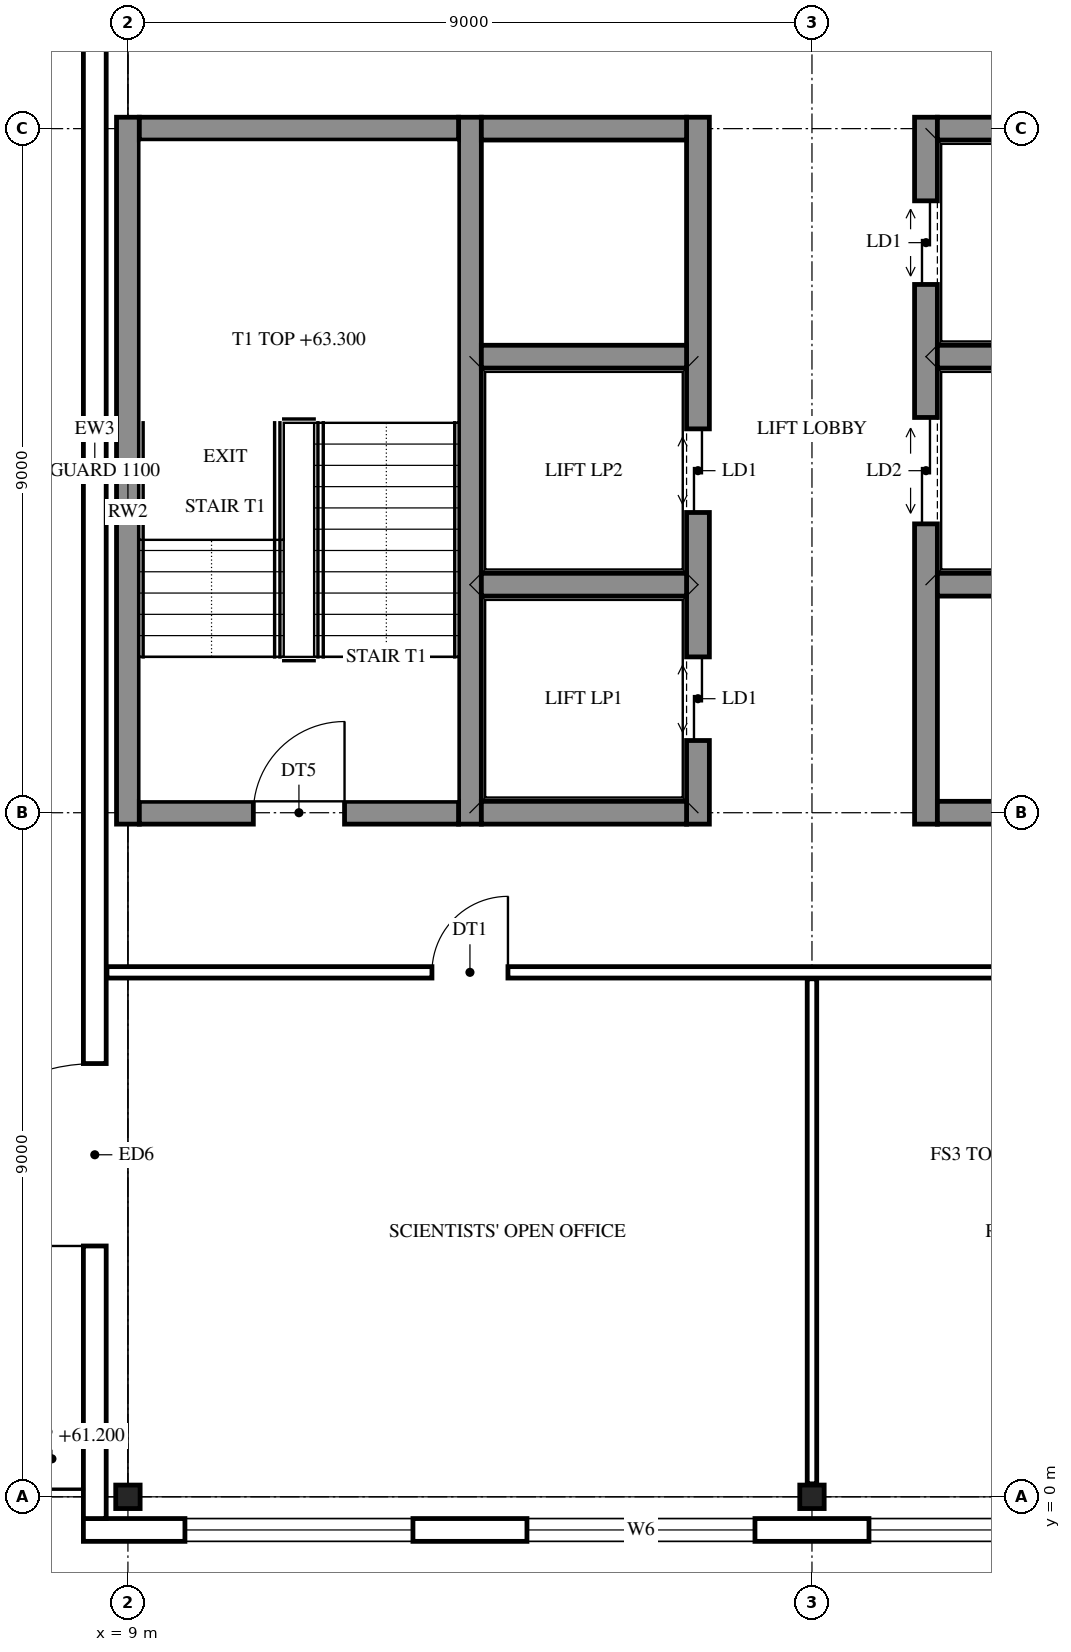
"""IFC4 building model, lengths in metres.
Left out: names, types, materials, properties, quantities, classifications, styles, units other than length and angle.
Written with IfcOpenShell. Run it as: python <this file> out.ifc"""

import sys

from ifc_helpers import new_model, si_unit, direction, frame, frame_2d, origin, origin_2d, place, context, subcontext, project, spatial, rectangle, i_section, extrude, element, fill, save


model = new_model("IFC4")
c1 = context("Model", 3, precision=1e-05, world=origin(), true_north=direction((0.0, 1.0)))
c2 = subcontext(c1, "Body", "Model", "MODEL_VIEW")
j1 = project(units=[si_unit("LENGTHUNIT", "METRE"), si_unit("PLANEANGLEUNIT", "RADIAN")], contexts=[c1])
p1 = place(None, origin())
s1 = spatial("IfcSite", under=j1, at=p1, CompositionType="ELEMENT")
p2 = place(p1, origin())
s2 = spatial("IfcBuilding", under=s1, at=p2, CompositionType="ELEMENT")
p3 = place(p2, frame((0.0, 0.0, 61.2)))
s3 = spatial("IfcBuildingStorey", under=s2, at=p3, CompositionType="ELEMENT", Elevation=61.2)
for number, where, z_axis, x_axis in (
    (1, (9.0, 0.0, 0.0), (0.0, 0.0, 1.0), (0.0, 1.0, 0.0)),
    (2, (18.0, 0.0, 0.0), (0.0, 0.0, 1.0), (0.0, 1.0, 0.0)),
):
    element("IfcColumn", number, at=place(p3, frame(where, z_axis=z_axis, x_axis=x_axis)), inside=s3, PredefinedType="COLUMN", context=c2, shape_type="SweptSolid", body=[
        extrude(i_section(OverallWidth=0.309, OverallDepth=0.321, WebThickness=0.014, FlangeThickness=0.022, FilletRadius=0.017, at=origin_2d()), origin(), (0.0, 0.0, 1.0), 4.2),
    ])
for number, where, z_axis, x_axis in (
    (3, (9.0, 8.85, 0.0), (0.0, 0.0, 1.0), (0.0, 1.0, 0.0)),
    (4, (13.5, 8.85, 0.0), (0.0, 0.0, 1.0), (0.0, 1.0, 0.0)),
):
    element("IfcWall", number, at=place(p3, frame(where, z_axis=z_axis, x_axis=x_axis)), inside=s3, PredefinedType="SHEAR", context=c2, shape_type="SweptSolid", body=[
        extrude(rectangle(XDim=9.3, YDim=0.3, at=frame_2d((4.65, 0.0))), origin(), (0.0, 0.0, 1.0), 4.2),
    ])
p4 = place(p3, frame((16.5, 8.85, 0.0), z_axis=(0.0, 0.0, 1.0), x_axis=(0.0, 1.0, 0.0)))
e5 = element("IfcWall", 5, at=p4, inside=s3, PredefinedType="SHEAR", context=c2, shape_type="SweptSolid", body=[
    extrude(rectangle(XDim=9.3, YDim=0.3, at=frame_2d((4.65, 0.0))), origin(), (0.0, 0.0, 1.0), 4.2),
])
p5 = place(p4, frame((1.1, 0.0, 0.0)))
e6 = element("IfcOpeningElement", 6, at=p5, cuts=e5, PredefinedType="OPENING", context=c2, shape_type="SweptSolid", body=[
    extrude(rectangle(XDim=1.1, YDim=2.1, at=frame_2d((0.55, 1.05))), frame((0.0, 0.16, 0.0), z_axis=(0.0, -1.0, 0.0), x_axis=(1.0, 0.0, 0.0)), (0.0, 0.0, 1.0), 0.32),
])
p6 = place(p4, frame((4.1, 0.0, 0.0)))
e7 = element("IfcOpeningElement", 7, at=p6, cuts=e5, PredefinedType="OPENING", context=c2, shape_type="SweptSolid", body=[
    extrude(rectangle(XDim=1.1, YDim=2.1, at=frame_2d((0.55, 1.05))), frame((0.0, 0.16, 0.0), z_axis=(0.0, -1.0, 0.0), x_axis=(1.0, 0.0, 0.0)), (0.0, 0.0, 1.0), 0.32),
])
p7 = place(p3, frame((19.5, 8.85, 0.0), z_axis=(0.0, 0.0, 1.0), x_axis=(0.0, 1.0, 0.0)))
e8 = element("IfcWall", 8, at=p7, inside=s3, PredefinedType="SHEAR", context=c2, shape_type="SweptSolid", body=[
    extrude(rectangle(XDim=9.3, YDim=0.3, at=frame_2d((4.65, 0.0))), origin(), (0.0, 0.0, 1.0), 4.2),
])
p8 = place(p7, frame((3.95, 0.0, 0.0)))
e9 = element("IfcOpeningElement", 9, at=p8, cuts=e8, PredefinedType="OPENING", context=c2, shape_type="SweptSolid", body=[
    extrude(rectangle(XDim=1.4, YDim=2.1, at=frame_2d((0.7, 1.05))), frame((0.0, 0.16, 0.0), z_axis=(0.0, -1.0, 0.0), x_axis=(1.0, 0.0, 0.0)), (0.0, 0.0, 1.0), 0.32),
])
p9 = place(p7, frame((7.1, 0.0, 0.0)))
e10 = element("IfcOpeningElement", 10, at=p9, cuts=e8, PredefinedType="OPENING", context=c2, shape_type="SweptSolid", body=[
    extrude(rectangle(XDim=1.1, YDim=2.1, at=frame_2d((0.55, 1.05))), frame((0.0, 0.16, 0.0), z_axis=(0.0, -1.0, 0.0), x_axis=(1.0, 0.0, 0.0)), (0.0, 0.0, 1.0), 0.32),
])
p10 = place(p3, frame((9.15, 9.0, 0.0), z_axis=(0.0, 0.0, 1.0), x_axis=(1.0, 0.0, 0.0)))
e11 = element("IfcWall", 11, at=p10, inside=s3, PredefinedType="SHEAR", context=c2, shape_type="SweptSolid", body=[
    extrude(rectangle(XDim=4.2, YDim=0.3, at=frame_2d((2.1, 0.0))), origin(), (0.0, 0.0, 1.0), 4.2),
])
p11 = place(p10, frame((1.5, 0.0, 0.0)))
e12 = element("IfcOpeningElement", 12, at=p11, cuts=e11, PredefinedType="OPENING", context=c2, shape_type="SweptSolid", body=[
    extrude(rectangle(XDim=1.2, YDim=2.1, at=frame_2d((0.6, 1.05))), frame((0.0, 0.16, 0.0), z_axis=(0.0, -1.0, 0.0), x_axis=(1.0, 0.0, 0.0)), (0.0, 0.0, 1.0), 0.32),
])
for number, where, z_axis, x_axis in (
    (13, (13.65, 9.0, 0.0), (0.0, 0.0, 1.0), (1.0, 0.0, 0.0)),
    (14, (19.65, 9.0, 0.0), (0.0, 0.0, 1.0), (1.0, 0.0, 0.0)),
    (15, (13.65, 12.0, 0.0), (0.0, 0.0, 1.0), (1.0, 0.0, 0.0)),
    (16, (19.65, 12.0, 0.0), (0.0, 0.0, 1.0), (1.0, 0.0, 0.0)),
    (17, (13.65, 15.0, 0.0), (0.0, 0.0, 1.0), (1.0, 0.0, 0.0)),
    (18, (19.65, 15.0, 0.0), (0.0, 0.0, 1.0), (1.0, 0.0, 0.0)),
):
    element("IfcWall", number, at=place(p3, frame(where, z_axis=z_axis, x_axis=x_axis)), inside=s3, PredefinedType="SHEAR", context=c2, shape_type="SweptSolid", body=[
        extrude(rectangle(XDim=2.7, YDim=0.3, at=frame_2d((1.35, 0.0))), origin(), (0.0, 0.0, 1.0), 4.2),
    ])
p12 = place(p3, frame((9.15, 18.0, 0.0), z_axis=(0.0, 0.0, 1.0), x_axis=(1.0, 0.0, 0.0)))
e19 = element("IfcWall", 19, at=p12, inside=s3, PredefinedType="SHEAR", context=c2, shape_type="SweptSolid", body=[
    extrude(rectangle(XDim=4.2, YDim=0.3, at=frame_2d((2.1, 0.0))), origin(), (0.0, 0.0, 1.0), 4.2),
])
for number, where, z_axis, x_axis in (
    (20, (13.65, 18.0, 0.0), (0.0, 0.0, 1.0), (1.0, 0.0, 0.0)),
    (21, (19.65, 18.0, 0.0), (0.0, 0.0, 1.0), (1.0, 0.0, 0.0)),
):
    element("IfcWall", number, at=place(p3, frame(where, z_axis=z_axis, x_axis=x_axis)), inside=s3, PredefinedType="SHEAR", context=c2, shape_type="SweptSolid", body=[
        extrude(rectangle(XDim=2.7, YDim=0.3, at=frame_2d((1.35, 0.0))), origin(), (0.0, 0.0, 1.0), 4.2),
    ])
p13 = place(p3, frame((32.075, -0.436, 0.0), z_axis=(0.0, 0.0, 1.0), x_axis=(-1.0, 0.0, 0.0)))
e22 = element("IfcWall", 22, at=p13, inside=s3, PredefinedType="STANDARD", context=c2, shape_type="SweptSolid", body=[
    extrude(rectangle(XDim=23.661, YDim=0.3, at=frame_2d((11.831, 0.0))), origin(), (0.0, 0.0, 1.0), 4.2),
])
p14 = place(p13, frame((19.325, 0.0, 0.6)))
e23 = element("IfcOpeningElement", 23, at=p14, cuts=e22, PredefinedType="OPENING", context=c2, shape_type="SweptSolid", body=[
    extrude(rectangle(XDim=3.0, YDim=2.8, at=frame_2d((1.5, 1.4))), frame((0.0, 0.16, 0.0), z_axis=(0.0, -1.0, 0.0), x_axis=(1.0, 0.0, 0.0)), (0.0, 0.0, 1.0), 0.32),
])
p15 = place(p13, frame((14.825, 0.0, 0.6)))
e24 = element("IfcOpeningElement", 24, at=p15, cuts=e22, PredefinedType="OPENING", context=c2, shape_type="SweptSolid", body=[
    extrude(rectangle(XDim=3.0, YDim=2.8, at=frame_2d((1.5, 1.4))), frame((0.0, 0.16, 0.0), z_axis=(0.0, -1.0, 0.0), x_axis=(1.0, 0.0, 0.0)), (0.0, 0.0, 1.0), 0.32),
])
p16 = place(p13, frame((10.325, 0.0, 0.6)))
e25 = element("IfcOpeningElement", 25, at=p16, cuts=e22, PredefinedType="OPENING", context=c2, shape_type="SweptSolid", body=[
    extrude(rectangle(XDim=3.0, YDim=2.8, at=frame_2d((1.5, 1.4))), frame((0.0, 0.16, 0.0), z_axis=(0.0, -1.0, 0.0), x_axis=(1.0, 0.0, 0.0)), (0.0, 0.0, 1.0), 0.32),
])
p17 = place(p13, frame((5.825, 0.0, 0.6)))
e26 = element("IfcOpeningElement", 26, at=p17, cuts=e22, PredefinedType="OPENING", context=c2, shape_type="SweptSolid", body=[
    extrude(rectangle(XDim=3.0, YDim=2.8, at=frame_2d((1.5, 1.4))), frame((0.0, 0.16, 0.0), z_axis=(0.0, -1.0, 0.0), x_axis=(1.0, 0.0, 0.0)), (0.0, 0.0, 1.0), 0.32),
])
p18 = place(p13, frame((1.325, 0.0, 0.6)))
e27 = element("IfcOpeningElement", 27, at=p18, cuts=e22, PredefinedType="OPENING", context=c2, shape_type="SweptSolid", body=[
    extrude(rectangle(XDim=3.0, YDim=2.8, at=frame_2d((1.5, 1.4))), frame((0.0, 0.16, 0.0), z_axis=(0.0, -1.0, 0.0), x_axis=(1.0, 0.0, 0.0)), (0.0, 0.0, 1.0), 0.32),
])
p19 = place(p3, frame((8.564, -0.286, 0.0), z_axis=(0.0, 0.0, 1.0), x_axis=(0.0, 1.0, 0.0)))
e28 = element("IfcWall", 28, at=p19, inside=s3, PredefinedType="STANDARD", context=c2, shape_type="SweptSolid", body=[
    extrude(rectangle(XDim=27.572, YDim=0.3, at=frame_2d((13.786, 0.0))), origin(), (0.0, 0.0, 1.0), 4.2),
])
p20 = place(p19, frame((3.586, 0.0, 0.012)))
e29 = element("IfcOpeningElement", 29, at=p20, cuts=e28, PredefinedType="OPENING", context=c2, shape_type="SweptSolid", body=[
    extrude(rectangle(XDim=2.4, YDim=2.4, at=frame_2d((1.2, 1.2))), frame((0.0, 0.16, 0.0), z_axis=(0.0, -1.0, 0.0), x_axis=(1.0, 0.0, 0.0)), (0.0, 0.0, 1.0), 0.32),
])
p21 = place(p19, frame((21.586, 0.0, 0.012)))
e30 = element("IfcOpeningElement", 30, at=p21, cuts=e28, PredefinedType="OPENING", context=c2, shape_type="SweptSolid", body=[
    extrude(rectangle(XDim=2.4, YDim=2.4, at=frame_2d((1.2, 1.2))), frame((0.0, 0.16, 0.0), z_axis=(0.0, -1.0, 0.0), x_axis=(1.0, 0.0, 0.0)), (0.0, 0.0, 1.0), 0.32),
])
p22 = place(p3, frame((18.0, 0.17, 0.0), z_axis=(0.0, 0.0, 1.0), x_axis=(0.0, 1.0, 0.0)))
e31 = element("IfcWall", 31, at=p22, inside=s3, PredefinedType="PARTITIONING", context=c2, shape_type="SweptSolid", body=[
    extrude(rectangle(XDim=6.645, YDim=0.125, at=frame_2d((3.322, 0.0))), origin(), (0.0, 0.0, 1.0), 3.537),
])
p23 = place(p3, frame((8.724, 6.9, 0.0), z_axis=(0.0, 0.0, 1.0), x_axis=(1.0, 0.0, 0.0)))
e32 = element("IfcWall", 32, at=p23, inside=s3, PredefinedType="PARTITIONING", context=c2, shape_type="SweptSolid", body=[
    extrude(rectangle(XDim=18.276, YDim=0.15, at=frame_2d((9.138, 0.0))), origin(), (0.0, 0.0, 1.0), 3.537),
])
p24 = place(p23, frame((4.276, 0.0, 0.0)))
e33 = element("IfcOpeningElement", 33, at=p24, cuts=e32, PredefinedType="OPENING", context=c2, shape_type="SweptSolid", body=[
    extrude(rectangle(XDim=1.0, YDim=2.1, at=frame_2d((0.5, 1.05))), frame((0.0, 0.085, 0.0), z_axis=(0.0, -1.0, 0.0), x_axis=(1.0, 0.0, 0.0)), (0.0, 0.0, 1.0), 0.17),
])
p25 = place(p23, frame((14.476, 0.0, 0.0)))
e34 = element("IfcOpeningElement", 34, at=p25, cuts=e32, PredefinedType="OPENING", context=c2, shape_type="SweptSolid", body=[
    extrude(rectangle(XDim=1.0, YDim=2.1, at=frame_2d((0.5, 1.05))), frame((0.0, 0.085, 0.0), z_axis=(0.0, -1.0, 0.0), x_axis=(1.0, 0.0, 0.0)), (0.0, 0.0, 1.0), 0.17),
])
p26 = place(p14, origin())
e35 = element("IfcWindow", 35, at=p26, inside=s3, PartitioningType="SINGLE_PANEL", PredefinedType="WINDOW", context=c2, shape_type="SweptSolid", body=[
    extrude(rectangle(XDim=3.0, YDim=2.8, at=frame_2d((1.5, 1.4))), frame((0.0, 0.03, 0.0), z_axis=(0.0, -1.0, 0.0), x_axis=(1.0, 0.0, 0.0)), (0.0, 0.0, 1.0), 0.06),
])
fill(e23, e35)
p27 = place(p15, origin())
e36 = element("IfcWindow", 36, at=p27, inside=s3, PartitioningType="SINGLE_PANEL", PredefinedType="WINDOW", context=c2, shape_type="SweptSolid", body=[
    extrude(rectangle(XDim=3.0, YDim=2.8, at=frame_2d((1.5, 1.4))), frame((0.0, 0.03, 0.0), z_axis=(0.0, -1.0, 0.0), x_axis=(1.0, 0.0, 0.0)), (0.0, 0.0, 1.0), 0.06),
])
fill(e24, e36)
p28 = place(p16, origin())
e37 = element("IfcWindow", 37, at=p28, inside=s3, PartitioningType="SINGLE_PANEL", PredefinedType="WINDOW", context=c2, shape_type="SweptSolid", body=[
    extrude(rectangle(XDim=3.0, YDim=2.8, at=frame_2d((1.5, 1.4))), frame((0.0, 0.03, 0.0), z_axis=(0.0, -1.0, 0.0), x_axis=(1.0, 0.0, 0.0)), (0.0, 0.0, 1.0), 0.06),
])
fill(e25, e37)
p29 = place(p20, origin())
e38 = element("IfcDoor", 38, at=p29, inside=s3, OperationType="DOUBLE_DOOR_DOUBLE_SWING", PredefinedType="DOOR", context=c2, shape_type="SweptSolid", body=[
    extrude(rectangle(XDim=2.4, YDim=2.4, at=frame_2d((1.2, 1.2))), frame((0.0, 0.025, 0.0), z_axis=(0.0, -1.0, 0.0), x_axis=(1.0, 0.0, 0.0)), (0.0, 0.0, 1.0), 0.05),
])
fill(e29, e38)
p30 = place(p11, origin())
e39 = element("IfcDoor", 39, at=p30, inside=s3, OperationType="SINGLE_SWING_RIGHT", PredefinedType="DOOR", context=c2, shape_type="SweptSolid", body=[
    extrude(rectangle(XDim=1.2, YDim=2.1, at=frame_2d((0.6, 1.05))), frame((0.0, 0.025, 0.0), z_axis=(0.0, -1.0, 0.0), x_axis=(1.0, 0.0, 0.0)), (0.0, 0.0, 1.0), 0.05),
])
fill(e12, e39)
p31 = place(p24, frame((1.0, 0.0, 0.0), z_axis=(0.0, 0.0, 1.0), x_axis=(-1.0, 0.0, 0.0)))
e40 = element("IfcDoor", 40, at=p31, inside=s3, OperationType="SINGLE_SWING_RIGHT", PredefinedType="DOOR", context=c2, shape_type="SweptSolid", body=[
    extrude(rectangle(XDim=1.0, YDim=2.1, at=frame_2d((0.5, 1.05))), frame((0.0, 0.025, 0.0), z_axis=(0.0, -1.0, 0.0), x_axis=(1.0, 0.0, 0.0)), (0.0, 0.0, 1.0), 0.05),
])
fill(e33, e40)
p32 = place(p5, origin())
e41 = element("IfcDoor", 41, at=p32, inside=s3, OperationType="DOUBLE_DOOR_SLIDING", PredefinedType="DOOR", context=c2, shape_type="SweptSolid", body=[
    extrude(rectangle(XDim=1.1, YDim=2.1, at=frame_2d((0.55, 1.05))), frame((0.0, 0.025, 0.0), z_axis=(0.0, -1.0, 0.0), x_axis=(1.0, 0.0, 0.0)), (0.0, 0.0, 1.0), 0.05),
])
fill(e6, e41)
p33 = place(p6, origin())
e42 = element("IfcDoor", 42, at=p33, inside=s3, OperationType="DOUBLE_DOOR_SLIDING", PredefinedType="DOOR", context=c2, shape_type="SweptSolid", body=[
    extrude(rectangle(XDim=1.1, YDim=2.1, at=frame_2d((0.55, 1.05))), frame((0.0, 0.025, 0.0), z_axis=(0.0, -1.0, 0.0), x_axis=(1.0, 0.0, 0.0)), (0.0, 0.0, 1.0), 0.05),
])
fill(e7, e42)
p34 = place(p8, origin())
e43 = element("IfcDoor", 43, at=p34, inside=s3, OperationType="DOUBLE_DOOR_SLIDING", PredefinedType="DOOR", context=c2, shape_type="SweptSolid", body=[
    extrude(rectangle(XDim=1.4, YDim=2.1, at=frame_2d((0.7, 1.05))), frame((0.0, 0.025, 0.0), z_axis=(0.0, -1.0, 0.0), x_axis=(1.0, 0.0, 0.0)), (0.0, 0.0, 1.0), 0.05),
])
fill(e9, e43)
p35 = place(p9, origin())
e44 = element("IfcDoor", 44, at=p35, inside=s3, OperationType="DOUBLE_DOOR_SLIDING", PredefinedType="DOOR", context=c2, shape_type="SweptSolid", body=[
    extrude(rectangle(XDim=1.1, YDim=2.1, at=frame_2d((0.55, 1.05))), frame((0.0, 0.025, 0.0), z_axis=(0.0, -1.0, 0.0), x_axis=(1.0, 0.0, 0.0)), (0.0, 0.0, 1.0), 0.05),
])
fill(e10, e44)
save(model, sys.argv[1])
